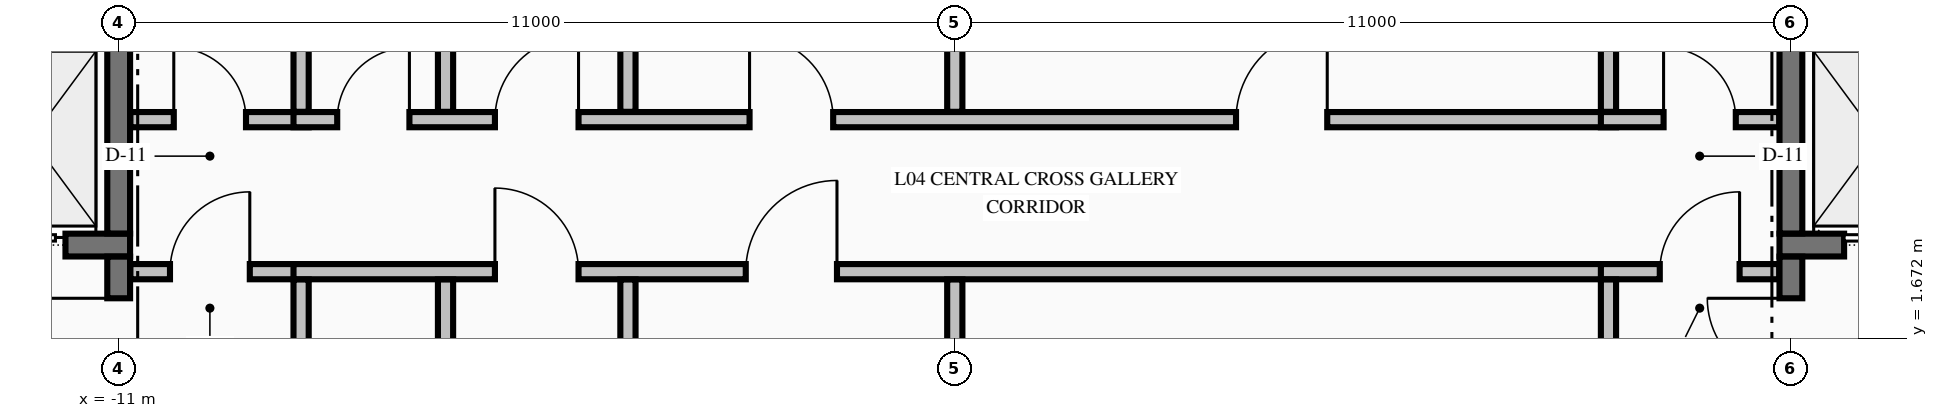
"""IFC4 building model, lengths in metres.
Left out: names, types, materials, properties, quantities, classifications, styles, units other than length and angle.
Written with IfcOpenShell. Run it as: python <this file> out.ifc"""

import sys

from ifc_helpers import new_model, si_unit, direction, frame, frame_2d, origin, place, context, subcontext, project, spatial, rectangle, extrude, element, fill, save


model = new_model("IFC4")
c1 = context("Model", 3, precision=1e-05, world=origin(), true_north=direction((0.0, 1.0)))
c2 = subcontext(c1, "Body", "Model", "MODEL_VIEW")
j1 = project(units=[si_unit("LENGTHUNIT", "METRE"), si_unit("PLANEANGLEUNIT", "RADIAN")], contexts=[c1])
p1 = place(None, origin())
s1 = spatial("IfcSite", under=j1, at=p1, CompositionType="ELEMENT")
p2 = place(p1, origin())
s2 = spatial("IfcBuilding", under=s1, at=p2, CompositionType="ELEMENT")
p3 = place(p2, frame((0.0, 0.0, 21.76)))
s3 = spatial("IfcBuildingStorey", under=s2, at=p3, CompositionType="ELEMENT", Elevation=21.76)
p4 = place(p3, frame((-14.875, 2.9, 0.0), z_axis=(0.0, 0.0, 1.0), x_axis=(1.0, 0.0, 0.0)))
e1 = element("IfcWall", 1, at=p4, inside=s3, PredefinedType="SHEAR", context=c2, shape_type="SweptSolid", body=[
    extrude(rectangle(XDim=4.025, YDim=0.3, at=frame_2d((2.012, 0.0))), origin(), (0.0, 0.0, 1.0), 4.99),
])
p5 = place(p4, frame((2.075, 0.0, 0.0)))
e2 = element("IfcOpeningElement", 2, at=p5, cuts=e1, PredefinedType="OPENING", context=c2, shape_type="SweptSolid", body=[
    extrude(rectangle(XDim=1.1, YDim=2.2, at=frame_2d((0.55, 1.1))), frame((0.0, 0.16, 0.0), z_axis=(0.0, -1.0, 0.0), x_axis=(1.0, 0.0, 0.0)), (0.0, 0.0, 1.0), 0.32),
])
p6 = place(p3, frame((10.85, 2.9, 0.0), z_axis=(0.0, 0.0, 1.0), x_axis=(1.0, 0.0, 0.0)))
e3 = element("IfcWall", 3, at=p6, inside=s3, PredefinedType="SHEAR", context=c2, shape_type="SweptSolid", body=[
    extrude(rectangle(XDim=4.025, YDim=0.3, at=frame_2d((2.012, 0.0))), origin(), (0.0, 0.0, 1.0), 4.99),
])
p7 = place(p6, frame((0.85, 0.0, 0.0)))
e4 = element("IfcOpeningElement", 4, at=p7, cuts=e3, PredefinedType="OPENING", context=c2, shape_type="SweptSolid", body=[
    extrude(rectangle(XDim=1.1, YDim=2.2, at=frame_2d((0.55, 1.1))), frame((0.0, 0.16, 0.0), z_axis=(0.0, -1.0, 0.0), x_axis=(1.0, 0.0, 0.0)), (0.0, 0.0, 1.0), 0.32),
])
p8 = place(p3, frame((-10.847, 2.55, 0.0), z_axis=(0.0, 0.0, 1.0), x_axis=(1.0, 0.0, 0.0)))
e5 = element("IfcWall", 5, at=p8, inside=s3, PredefinedType="PARTITIONING", context=c2, shape_type="SweptSolid", body=[
    extrude(rectangle(XDim=2.347, YDim=0.2, at=frame_2d((1.173, 0.0))), origin(), (0.0, 0.0, 1.0), 4.99),
])
p9 = place(p8, frame((0.522, 0.0, 0.0)))
e6 = element("IfcOpeningElement", 6, at=p9, cuts=e5, PredefinedType="OPENING", context=c2, shape_type="SweptSolid", body=[
    extrude(rectangle(XDim=1.05, YDim=2.15, at=frame_2d((0.525, 1.075))), frame((0.0, 0.11, 0.0), z_axis=(0.0, -1.0, 0.0), x_axis=(1.0, 0.0, 0.0)), (0.0, 0.0, 1.0), 0.22),
])
p10 = place(p3, frame((-8.7, 2.55, 0.0), z_axis=(0.0, 0.0, 1.0), x_axis=(1.0, 0.0, 0.0)))
e7 = element("IfcWall", 7, at=p10, inside=s3, PredefinedType="PARTITIONING", context=c2, shape_type="SweptSolid", body=[
    extrude(rectangle(XDim=17.4, YDim=0.2, at=frame_2d((8.7, 0.0))), origin(), (0.0, 0.0, 1.0), 4.99),
])
p11 = place(p10, frame((2.65, 0.0, 0.0)))
e8 = element("IfcOpeningElement", 8, at=p11, cuts=e7, PredefinedType="OPENING", context=c2, shape_type="SweptSolid", body=[
    extrude(rectangle(XDim=1.1, YDim=2.15, at=frame_2d((0.55, 1.075))), frame((0.0, 0.11, 0.0), z_axis=(0.0, -1.0, 0.0), x_axis=(1.0, 0.0, 0.0)), (0.0, 0.0, 1.0), 0.22),
])
p12 = place(p10, frame((5.95, 0.0, 0.0)))
e9 = element("IfcOpeningElement", 9, at=p12, cuts=e7, PredefinedType="OPENING", context=c2, shape_type="SweptSolid", body=[
    extrude(rectangle(XDim=1.2, YDim=2.15, at=frame_2d((0.6, 1.075))), frame((0.0, 0.11, 0.0), z_axis=(0.0, -1.0, 0.0), x_axis=(1.0, 0.0, 0.0)), (0.0, 0.0, 1.0), 0.22),
])
p13 = place(p3, frame((8.5, 2.55, 0.0), z_axis=(0.0, 0.0, 1.0), x_axis=(1.0, 0.0, 0.0)))
e10 = element("IfcWall", 10, at=p13, inside=s3, PredefinedType="PARTITIONING", context=c2, shape_type="SweptSolid", body=[
    extrude(rectangle(XDim=2.347, YDim=0.2, at=frame_2d((1.173, 0.0))), origin(), (0.0, 0.0, 1.0), 4.99),
])
p14 = place(p13, frame((0.775, 0.0, 0.0)))
e11 = element("IfcOpeningElement", 11, at=p14, cuts=e10, PredefinedType="OPENING", context=c2, shape_type="SweptSolid", body=[
    extrude(rectangle(XDim=1.05, YDim=2.15, at=frame_2d((0.525, 1.075))), frame((0.0, 0.11, 0.0), z_axis=(0.0, -1.0, 0.0), x_axis=(1.0, 0.0, 0.0)), (0.0, 0.0, 1.0), 0.22),
])
p15 = place(p3, frame((-10.847, 4.55, 0.0), z_axis=(0.0, 0.0, 1.0), x_axis=(1.0, 0.0, 0.0)))
e12 = element("IfcWall", 12, at=p15, inside=s3, PredefinedType="PARTITIONING", context=c2, shape_type="SweptSolid", body=[
    extrude(rectangle(XDim=2.347, YDim=0.2, at=frame_2d((1.173, 0.0))), origin(), (0.0, 0.0, 1.0), 4.99),
])
p16 = place(p15, frame((0.572, 0.0, 0.0)))
e13 = element("IfcOpeningElement", 13, at=p16, cuts=e12, PredefinedType="OPENING", context=c2, shape_type="SweptSolid", body=[
    extrude(rectangle(XDim=0.95, YDim=2.15, at=frame_2d((0.475, 1.075))), frame((0.0, 0.11, 0.0), z_axis=(0.0, -1.0, 0.0), x_axis=(1.0, 0.0, 0.0)), (0.0, 0.0, 1.0), 0.22),
])
p17 = place(p3, frame((-8.7, 4.55, 0.0), z_axis=(0.0, 0.0, 1.0), x_axis=(1.0, 0.0, 0.0)))
e14 = element("IfcWall", 14, at=p17, inside=s3, PredefinedType="PARTITIONING", context=c2, shape_type="SweptSolid", body=[
    extrude(rectangle(XDim=17.4, YDim=0.2, at=frame_2d((8.7, 0.0))), origin(), (0.0, 0.0, 1.0), 4.99),
])
p18 = place(p17, frame((2.65, 0.0, 0.0)))
e15 = element("IfcOpeningElement", 15, at=p18, cuts=e14, PredefinedType="OPENING", context=c2, shape_type="SweptSolid", body=[
    extrude(rectangle(XDim=1.1, YDim=2.15, at=frame_2d((0.55, 1.075))), frame((0.0, 0.11, 0.0), z_axis=(0.0, -1.0, 0.0), x_axis=(1.0, 0.0, 0.0)), (0.0, 0.0, 1.0), 0.22),
])
p19 = place(p17, frame((0.575, 0.0, 0.0)))
e16 = element("IfcOpeningElement", 16, at=p19, cuts=e14, PredefinedType="OPENING", context=c2, shape_type="SweptSolid", body=[
    extrude(rectangle(XDim=0.95, YDim=2.15, at=frame_2d((0.475, 1.075))), frame((0.0, 0.11, 0.0), z_axis=(0.0, -1.0, 0.0), x_axis=(1.0, 0.0, 0.0)), (0.0, 0.0, 1.0), 0.22),
])
p20 = place(p17, frame((6.0, 0.0, 0.0)))
e17 = element("IfcOpeningElement", 17, at=p20, cuts=e14, PredefinedType="OPENING", context=c2, shape_type="SweptSolid", body=[
    extrude(rectangle(XDim=1.1, YDim=2.15, at=frame_2d((0.55, 1.075))), frame((0.0, 0.11, 0.0), z_axis=(0.0, -1.0, 0.0), x_axis=(1.0, 0.0, 0.0)), (0.0, 0.0, 1.0), 0.22),
])
p21 = place(p17, frame((12.4, 0.0, 0.0)))
e18 = element("IfcOpeningElement", 18, at=p21, cuts=e14, PredefinedType="OPENING", context=c2, shape_type="SweptSolid", body=[
    extrude(rectangle(XDim=1.2, YDim=2.15, at=frame_2d((0.6, 1.075))), frame((0.0, 0.11, 0.0), z_axis=(0.0, -1.0, 0.0), x_axis=(1.0, 0.0, 0.0)), (0.0, 0.0, 1.0), 0.22),
])
p22 = place(p3, frame((8.5, 4.55, 0.0), z_axis=(0.0, 0.0, 1.0), x_axis=(1.0, 0.0, 0.0)))
e19 = element("IfcWall", 19, at=p22, inside=s3, PredefinedType="PARTITIONING", context=c2, shape_type="SweptSolid", body=[
    extrude(rectangle(XDim=2.347, YDim=0.2, at=frame_2d((1.173, 0.0))), origin(), (0.0, 0.0, 1.0), 4.99),
])
p23 = place(p22, frame((0.825, 0.0, 0.0)))
e20 = element("IfcOpeningElement", 20, at=p23, cuts=e19, PredefinedType="OPENING", context=c2, shape_type="SweptSolid", body=[
    extrude(rectangle(XDim=0.95, YDim=2.15, at=frame_2d((0.475, 1.075))), frame((0.0, 0.11, 0.0), z_axis=(0.0, -1.0, 0.0), x_axis=(1.0, 0.0, 0.0)), (0.0, 0.0, 1.0), 0.22),
])
p24 = place(p3, frame((-11.0, 0.804, 0.0), z_axis=(0.0, 0.0, 1.0), x_axis=(0.0, 1.0, 0.0)))
e21 = element("IfcWall", 21, at=p24, inside=s3, PredefinedType="SHEAR", context=c2, shape_type="SweptSolid", body=[
    extrude(rectangle(XDim=1.944, YDim=0.3, at=frame_2d((0.972, 0.0))), origin(), (0.0, 0.0, 1.0), 4.99),
])
p25 = place(p24, frame((0.296, 0.0, 0.0)))
e22 = element("IfcOpeningElement", 22, at=p25, cuts=e21, PredefinedType="OPENING", context=c2, shape_type="SweptSolid", body=[
    extrude(rectangle(XDim=1.1, YDim=2.15, at=frame_2d((0.55, 1.075))), frame((0.0, 0.16, 0.0), z_axis=(0.0, -1.0, 0.0), x_axis=(1.0, 0.0, 0.0)), (0.0, 0.0, 1.0), 0.32),
])
p26 = place(p3, frame((-11.0, 3.052, 0.0), z_axis=(0.0, 0.0, 1.0), x_axis=(0.0, 1.0, 0.0)))
e23 = element("IfcWall", 23, at=p26, inside=s3, PredefinedType="SHEAR", context=c2, shape_type="SweptSolid", body=[
    extrude(rectangle(XDim=2.496, YDim=0.3, at=frame_2d((1.248, 0.0))), origin(), (0.0, 0.0, 1.0), 4.99),
])
p27 = place(p3, frame((11.0, 0.804, 0.0), z_axis=(0.0, 0.0, 1.0), x_axis=(0.0, 1.0, 0.0)))
e24 = element("IfcWall", 24, at=p27, inside=s3, PredefinedType="SHEAR", context=c2, shape_type="SweptSolid", body=[
    extrude(rectangle(XDim=1.944, YDim=0.3, at=frame_2d((0.972, 0.0))), origin(), (0.0, 0.0, 1.0), 4.99),
])
p28 = place(p27, frame((0.296, 0.0, 0.0)))
e25 = element("IfcOpeningElement", 25, at=p28, cuts=e24, PredefinedType="OPENING", context=c2, shape_type="SweptSolid", body=[
    extrude(rectangle(XDim=1.1, YDim=2.15, at=frame_2d((0.55, 1.075))), frame((0.0, 0.16, 0.0), z_axis=(0.0, -1.0, 0.0), x_axis=(1.0, 0.0, 0.0)), (0.0, 0.0, 1.0), 0.32),
])
p29 = place(p3, frame((11.0, 3.052, 0.0), z_axis=(0.0, 0.0, 1.0), x_axis=(0.0, 1.0, 0.0)))
e26 = element("IfcWall", 26, at=p29, inside=s3, PredefinedType="SHEAR", context=c2, shape_type="SweptSolid", body=[
    extrude(rectangle(XDim=2.496, YDim=0.3, at=frame_2d((1.248, 0.0))), origin(), (0.0, 0.0, 1.0), 4.99),
])
p30 = place(p3, frame((-8.6, -8.247, 0.0), z_axis=(0.0, 0.0, 1.0), x_axis=(0.0, 1.0, 0.0)))
e27 = element("IfcWall", 27, at=p30, inside=s3, PredefinedType="PARTITIONING", context=c2, shape_type="SweptSolid", body=[
    extrude(rectangle(XDim=10.694, YDim=0.2, at=frame_2d((5.347, 0.0))), origin(), (0.0, 0.0, 1.0), 4.99),
])
p31 = place(p30, frame((4.772, 0.0, 0.0)))
e28 = element("IfcOpeningElement", 28, at=p31, cuts=e27, PredefinedType="OPENING", context=c2, shape_type="SweptSolid", body=[
    extrude(rectangle(XDim=0.95, YDim=2.15, at=frame_2d((0.475, 1.075))), frame((0.0, 0.11, 0.0), z_axis=(0.0, -1.0, 0.0), x_axis=(1.0, 0.0, 0.0)), (0.0, 0.0, 1.0), 0.22),
])
p32 = place(p3, frame((-8.6, 4.653, 0.0), z_axis=(0.0, 0.0, 1.0), x_axis=(0.0, 1.0, 0.0)))
e29 = element("IfcWall", 29, at=p32, inside=s3, PredefinedType="PARTITIONING", context=c2, shape_type="SweptSolid", body=[
    extrude(rectangle(XDim=3.594, YDim=0.2, at=frame_2d((1.797, 0.0))), origin(), (0.0, 0.0, 1.0), 4.99),
])
p33 = place(p3, frame((-6.7, -8.247, 0.0), z_axis=(0.0, 0.0, 1.0), x_axis=(0.0, 1.0, 0.0)))
e30 = element("IfcWall", 30, at=p33, inside=s3, PredefinedType="PARTITIONING", context=c2, shape_type="SweptSolid", body=[
    extrude(rectangle(XDim=10.694, YDim=0.2, at=frame_2d((5.347, 0.0))), origin(), (0.0, 0.0, 1.0), 4.99),
])
p34 = place(p3, frame((-6.7, 4.653, 0.0), z_axis=(0.0, 0.0, 1.0), x_axis=(0.0, 1.0, 0.0)))
e31 = element("IfcWall", 31, at=p34, inside=s3, PredefinedType="PARTITIONING", context=c2, shape_type="SweptSolid", body=[
    extrude(rectangle(XDim=3.594, YDim=0.2, at=frame_2d((1.797, 0.0))), origin(), (0.0, 0.0, 1.0), 4.99),
])
p35 = place(p3, frame((-4.3, -8.247, 0.0), z_axis=(0.0, 0.0, 1.0), x_axis=(0.0, 1.0, 0.0)))
e32 = element("IfcWall", 32, at=p35, inside=s3, PredefinedType="PARTITIONING", context=c2, shape_type="SweptSolid", body=[
    extrude(rectangle(XDim=10.694, YDim=0.2, at=frame_2d((5.347, 0.0))), origin(), (0.0, 0.0, 1.0), 4.99),
])
p36 = place(p3, frame((-4.3, 4.653, 0.0), z_axis=(0.0, 0.0, 1.0), x_axis=(0.0, 1.0, 0.0)))
e33 = element("IfcWall", 33, at=p36, inside=s3, PredefinedType="PARTITIONING", context=c2, shape_type="SweptSolid", body=[
    extrude(rectangle(XDim=3.594, YDim=0.2, at=frame_2d((1.797, 0.0))), origin(), (0.0, 0.0, 1.0), 4.99),
])
p37 = place(p3, frame((0.0, 0.706, 0.0), z_axis=(0.0, 0.0, 1.0), x_axis=(0.0, 1.0, 0.0)))
e34 = element("IfcWall", 34, at=p37, inside=s3, PredefinedType="PARTITIONING", context=c2, shape_type="SweptSolid", body=[
    extrude(rectangle(XDim=1.741, YDim=0.2, at=frame_2d((0.871, 0.0))), origin(), (0.0, 0.0, 1.0), 3.332),
])
p38 = place(p3, frame((0.0, 4.653, 0.0), z_axis=(0.0, 0.0, 1.0), x_axis=(0.0, 1.0, 0.0)))
e35 = element("IfcWall", 35, at=p38, inside=s3, PredefinedType="PARTITIONING", context=c2, shape_type="SweptSolid", body=[
    extrude(rectangle(XDim=3.594, YDim=0.2, at=frame_2d((1.797, 0.0))), origin(), (0.0, 0.0, 1.0), 3.332),
])
p39 = place(p3, frame((8.6, -8.247, 0.0), z_axis=(0.0, 0.0, 1.0), x_axis=(0.0, 1.0, 0.0)))
e36 = element("IfcWall", 36, at=p39, inside=s3, PredefinedType="PARTITIONING", context=c2, shape_type="SweptSolid", body=[
    extrude(rectangle(XDim=10.694, YDim=0.2, at=frame_2d((5.347, 0.0))), origin(), (0.0, 0.0, 1.0), 4.99),
])
p40 = place(p39, frame((4.547, 0.0, 0.0)))
e37 = element("IfcOpeningElement", 37, at=p40, cuts=e36, PredefinedType="OPENING", context=c2, shape_type="SweptSolid", body=[
    extrude(rectangle(XDim=1.4, YDim=2.2, at=frame_2d((0.7, 1.1))), frame((0.0, 0.11, 0.0), z_axis=(0.0, -1.0, 0.0), x_axis=(1.0, 0.0, 0.0)), (0.0, 0.0, 1.0), 0.22),
])
p41 = place(p3, frame((8.6, 4.653, 0.0), z_axis=(0.0, 0.0, 1.0), x_axis=(0.0, 1.0, 0.0)))
e38 = element("IfcWall", 38, at=p41, inside=s3, PredefinedType="PARTITIONING", context=c2, shape_type="SweptSolid", body=[
    extrude(rectangle(XDim=3.594, YDim=0.2, at=frame_2d((1.797, 0.0))), origin(), (0.0, 0.0, 1.0), 4.99),
])
p42 = place(p25, origin())
e39 = element("IfcDoor", 39, at=p42, inside=s3, OperationType="SINGLE_SWING_RIGHT", PredefinedType="DOOR", context=c2, shape_type="SweptSolid", body=[
    extrude(rectangle(XDim=1.1, YDim=2.15, at=frame_2d((0.55, 1.075))), frame((0.0, 0.025, 0.0), z_axis=(0.0, -1.0, 0.0), x_axis=(1.0, 0.0, 0.0)), (0.0, 0.0, 1.0), 0.05),
])
fill(e22, e39)
p43 = place(p5, origin())
e40 = element("IfcDoor", 40, at=p43, inside=s3, OperationType="SLIDING_TO_LEFT", PredefinedType="DOOR", context=c2, shape_type="SweptSolid", body=[
    extrude(rectangle(XDim=1.1, YDim=2.2, at=frame_2d((0.55, 1.1))), frame((0.0, 0.025, 0.0), z_axis=(0.0, -1.0, 0.0), x_axis=(1.0, 0.0, 0.0)), (0.0, 0.0, 1.0), 0.05),
])
fill(e2, e40)
p44 = place(p28, origin())
e41 = element("IfcDoor", 41, at=p44, inside=s3, OperationType="SINGLE_SWING_RIGHT", PredefinedType="DOOR", context=c2, shape_type="SweptSolid", body=[
    extrude(rectangle(XDim=1.1, YDim=2.15, at=frame_2d((0.55, 1.075))), frame((0.0, 0.025, 0.0), z_axis=(0.0, -1.0, 0.0), x_axis=(1.0, 0.0, 0.0)), (0.0, 0.0, 1.0), 0.05),
])
fill(e25, e41)
p45 = place(p7, origin())
e42 = element("IfcDoor", 42, at=p45, inside=s3, OperationType="SLIDING_TO_RIGHT", PredefinedType="DOOR", context=c2, shape_type="SweptSolid", body=[
    extrude(rectangle(XDim=1.1, YDim=2.2, at=frame_2d((0.55, 1.1))), frame((0.0, 0.025, 0.0), z_axis=(0.0, -1.0, 0.0), x_axis=(1.0, 0.0, 0.0)), (0.0, 0.0, 1.0), 0.05),
])
fill(e4, e42)
p46 = place(p9, origin())
e43 = element("IfcDoor", 43, at=p46, inside=s3, OperationType="SINGLE_SWING_RIGHT", PredefinedType="DOOR", context=c2, shape_type="SweptSolid", body=[
    extrude(rectangle(XDim=1.05, YDim=2.15, at=frame_2d((0.525, 1.075))), frame((0.0, 0.025, 0.0), z_axis=(0.0, -1.0, 0.0), x_axis=(1.0, 0.0, 0.0)), (0.0, 0.0, 1.0), 0.05),
])
fill(e6, e43)
p47 = place(p16, origin())
e44 = element("IfcDoor", 44, at=p47, inside=s3, OperationType="SINGLE_SWING_LEFT", PredefinedType="DOOR", context=c2, shape_type="SweptSolid", body=[
    extrude(rectangle(XDim=0.95, YDim=2.15, at=frame_2d((0.475, 1.075))), frame((0.0, 0.025, 0.0), z_axis=(0.0, -1.0, 0.0), x_axis=(1.0, 0.0, 0.0)), (0.0, 0.0, 1.0), 0.05),
])
fill(e13, e44)
p48 = place(p14, origin())
e45 = element("IfcDoor", 45, at=p48, inside=s3, OperationType="SINGLE_SWING_RIGHT", PredefinedType="DOOR", context=c2, shape_type="SweptSolid", body=[
    extrude(rectangle(XDim=1.05, YDim=2.15, at=frame_2d((0.525, 1.075))), frame((0.0, 0.025, 0.0), z_axis=(0.0, -1.0, 0.0), x_axis=(1.0, 0.0, 0.0)), (0.0, 0.0, 1.0), 0.05),
])
fill(e11, e45)
p49 = place(p23, origin())
e46 = element("IfcDoor", 46, at=p49, inside=s3, OperationType="SINGLE_SWING_LEFT", PredefinedType="DOOR", context=c2, shape_type="SweptSolid", body=[
    extrude(rectangle(XDim=0.95, YDim=2.15, at=frame_2d((0.475, 1.075))), frame((0.0, 0.025, 0.0), z_axis=(0.0, -1.0, 0.0), x_axis=(1.0, 0.0, 0.0)), (0.0, 0.0, 1.0), 0.05),
])
fill(e20, e46)
p50 = place(p11, origin())
e47 = element("IfcDoor", 47, at=p50, inside=s3, OperationType="SINGLE_SWING_LEFT", PredefinedType="DOOR", context=c2, shape_type="SweptSolid", body=[
    extrude(rectangle(XDim=1.1, YDim=2.15, at=frame_2d((0.55, 1.075))), frame((0.0, 0.025, 0.0), z_axis=(0.0, -1.0, 0.0), x_axis=(1.0, 0.0, 0.0)), (0.0, 0.0, 1.0), 0.05),
])
fill(e8, e47)
p51 = place(p18, origin())
e48 = element("IfcDoor", 48, at=p51, inside=s3, OperationType="SINGLE_SWING_RIGHT", PredefinedType="DOOR", context=c2, shape_type="SweptSolid", body=[
    extrude(rectangle(XDim=1.1, YDim=2.15, at=frame_2d((0.55, 1.075))), frame((0.0, 0.025, 0.0), z_axis=(0.0, -1.0, 0.0), x_axis=(1.0, 0.0, 0.0)), (0.0, 0.0, 1.0), 0.05),
])
fill(e15, e48)
p52 = place(p12, origin())
e49 = element("IfcDoor", 49, at=p52, inside=s3, OperationType="SINGLE_SWING_RIGHT", PredefinedType="DOOR", context=c2, shape_type="SweptSolid", body=[
    extrude(rectangle(XDim=1.2, YDim=2.15, at=frame_2d((0.6, 1.075))), frame((0.0, 0.025, 0.0), z_axis=(0.0, -1.0, 0.0), x_axis=(1.0, 0.0, 0.0)), (0.0, 0.0, 1.0), 0.05),
])
fill(e9, e49)
p53 = place(p19, origin())
e50 = element("IfcDoor", 50, at=p53, inside=s3, OperationType="SINGLE_SWING_RIGHT", PredefinedType="DOOR", context=c2, shape_type="SweptSolid", body=[
    extrude(rectangle(XDim=0.95, YDim=2.15, at=frame_2d((0.475, 1.075))), frame((0.0, 0.025, 0.0), z_axis=(0.0, -1.0, 0.0), x_axis=(1.0, 0.0, 0.0)), (0.0, 0.0, 1.0), 0.05),
])
fill(e16, e50)
p54 = place(p20, origin())
e51 = element("IfcDoor", 51, at=p54, inside=s3, OperationType="SINGLE_SWING_LEFT", PredefinedType="DOOR", context=c2, shape_type="SweptSolid", body=[
    extrude(rectangle(XDim=1.1, YDim=2.15, at=frame_2d((0.55, 1.075))), frame((0.0, 0.025, 0.0), z_axis=(0.0, -1.0, 0.0), x_axis=(1.0, 0.0, 0.0)), (0.0, 0.0, 1.0), 0.05),
])
fill(e17, e51)
p55 = place(p21, origin())
e52 = element("IfcDoor", 52, at=p55, inside=s3, OperationType="SINGLE_SWING_RIGHT", PredefinedType="DOOR", context=c2, shape_type="SweptSolid", body=[
    extrude(rectangle(XDim=1.2, YDim=2.15, at=frame_2d((0.6, 1.075))), frame((0.0, 0.025, 0.0), z_axis=(0.0, -1.0, 0.0), x_axis=(1.0, 0.0, 0.0)), (0.0, 0.0, 1.0), 0.05),
])
fill(e18, e52)
save(model, sys.argv[1])
